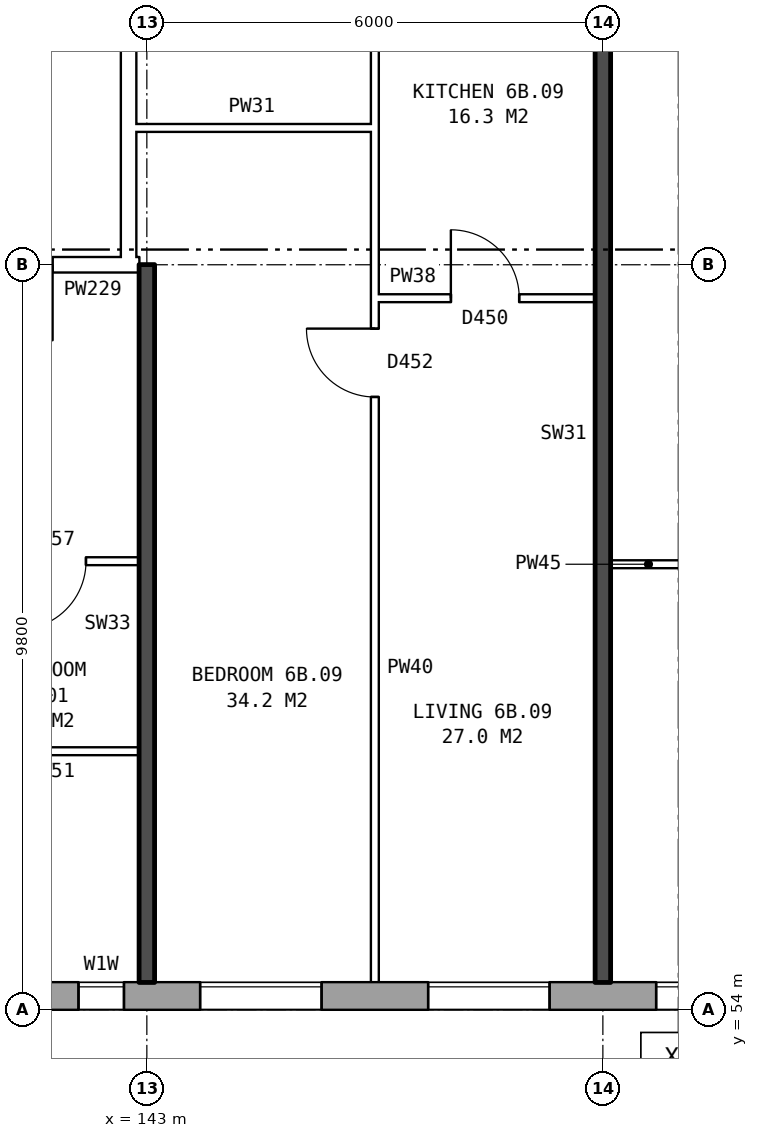
"""IFC4 building model, lengths in metres.
Left out: names, types, materials, properties, quantities, classifications, styles, units other than length and angle.
Written with IfcOpenShell. Run it as: python <this file> out.ifc"""

import sys

from ifc_helpers import new_model, si_unit, direction, frame, frame_2d, origin, place, context, subcontext, project, spatial, rectangle, extrude, element, fill, save


model = new_model("IFC4")
c1 = context("Model", 3, precision=1e-05, world=origin(), true_north=direction((0.0, 1.0)))
c2 = subcontext(c1, "Body", "Model", "MODEL_VIEW")
j1 = project(units=[si_unit("LENGTHUNIT", "METRE"), si_unit("PLANEANGLEUNIT", "RADIAN")], contexts=[c1])
p1 = place(None, origin())
s1 = spatial("IfcSite", under=j1, at=p1, CompositionType="ELEMENT")
p2 = place(p1, origin())
s2 = spatial("IfcBuilding", under=s1, at=p2, CompositionType="ELEMENT")
p3 = place(p2, frame((0.0, 0.0, 25.7)))
s3 = spatial("IfcBuildingStorey", under=s2, at=p3, CompositionType="ELEMENT", Elevation=25.7)
p4 = place(p3, frame((134.075, 54.18, 0.0), z_axis=(0.0, 0.0, 1.0), x_axis=(1.0, 0.0, 0.0)))
e1 = element("IfcWall", 1, at=p4, inside=s3, PredefinedType="STANDARD", context=c2, shape_type="SweptSolid", body=[
    extrude(rectangle(XDim=40.601, YDim=0.36, at=frame_2d((20.3, 0.0))), origin(), (0.0, 0.0, 1.0), 2.85),
])
p5 = place(p4, frame((0.625, 0.0, 0.8)))
e2 = element("IfcOpeningElement", 2, at=p5, cuts=e1, PredefinedType="OPENING", context=c2, shape_type="SweptSolid", body=[
    extrude(rectangle(XDim=1.6, YDim=1.8, at=frame_2d((0.8, 0.9))), frame((0.0, 0.19, 0.0), z_axis=(0.0, -1.0, 0.0), x_axis=(1.0, 0.0, 0.0)), (0.0, 0.0, 1.0), 0.38),
])
p6 = place(p4, frame((3.625, 0.0, 0.8)))
e3 = element("IfcOpeningElement", 3, at=p6, cuts=e1, PredefinedType="OPENING", context=c2, shape_type="SweptSolid", body=[
    extrude(rectangle(XDim=1.6, YDim=1.8, at=frame_2d((0.8, 0.9))), frame((0.0, 0.19, 0.0), z_axis=(0.0, -1.0, 0.0), x_axis=(1.0, 0.0, 0.0)), (0.0, 0.0, 1.0), 0.38),
])
p7 = place(p4, frame((5.525, 0.0, 1.7)))
e4 = element("IfcOpeningElement", 4, at=p7, cuts=e1, PredefinedType="OPENING", context=c2, shape_type="SweptSolid", body=[
    extrude(rectangle(XDim=1.2, YDim=0.9, at=frame_2d((0.6, 0.45))), frame((0.0, 0.19, 0.0), z_axis=(0.0, -1.0, 0.0), x_axis=(1.0, 0.0, 0.0)), (0.0, 0.0, 1.0), 0.38),
])
p8 = place(p4, frame((9.625, 0.0, 0.8)))
e5 = element("IfcOpeningElement", 5, at=p8, cuts=e1, PredefinedType="OPENING", context=c2, shape_type="SweptSolid", body=[
    extrude(rectangle(XDim=1.6, YDim=1.8, at=frame_2d((0.8, 0.9))), frame((0.0, 0.19, 0.0), z_axis=(0.0, -1.0, 0.0), x_axis=(1.0, 0.0, 0.0)), (0.0, 0.0, 1.0), 0.38),
])
p9 = place(p4, frame((12.625, 0.0, 0.8)))
e6 = element("IfcOpeningElement", 6, at=p9, cuts=e1, PredefinedType="OPENING", context=c2, shape_type="SweptSolid", body=[
    extrude(rectangle(XDim=1.6, YDim=1.8, at=frame_2d((0.8, 0.9))), frame((0.0, 0.19, 0.0), z_axis=(0.0, -1.0, 0.0), x_axis=(1.0, 0.0, 0.0)), (0.0, 0.0, 1.0), 0.38),
])
p10 = place(p4, frame((15.625, 0.0, 0.8)))
e7 = element("IfcOpeningElement", 7, at=p10, cuts=e1, PredefinedType="OPENING", context=c2, shape_type="SweptSolid", body=[
    extrude(rectangle(XDim=1.6, YDim=1.8, at=frame_2d((0.8, 0.9))), frame((0.0, 0.19, 0.0), z_axis=(0.0, -1.0, 0.0), x_axis=(1.0, 0.0, 0.0)), (0.0, 0.0, 1.0), 0.38),
])
p11 = place(p4, frame((18.625, 0.0, 0.8)))
e8 = element("IfcOpeningElement", 8, at=p11, cuts=e1, PredefinedType="OPENING", context=c2, shape_type="SweptSolid", body=[
    extrude(rectangle(XDim=1.6, YDim=1.8, at=frame_2d((0.8, 0.9))), frame((0.0, 0.19, 0.0), z_axis=(0.0, -1.0, 0.0), x_axis=(1.0, 0.0, 0.0)), (0.0, 0.0, 1.0), 0.38),
])
p12 = place(p4, frame((21.625, 0.0, 0.8)))
e9 = element("IfcOpeningElement", 9, at=p12, cuts=e1, PredefinedType="OPENING", context=c2, shape_type="SweptSolid", body=[
    extrude(rectangle(XDim=1.6, YDim=1.8, at=frame_2d((0.8, 0.9))), frame((0.0, 0.19, 0.0), z_axis=(0.0, -1.0, 0.0), x_axis=(1.0, 0.0, 0.0)), (0.0, 0.0, 1.0), 0.38),
])
p13 = place(p4, frame((24.625, 0.0, 0.8)))
e10 = element("IfcOpeningElement", 10, at=p13, cuts=e1, PredefinedType="OPENING", context=c2, shape_type="SweptSolid", body=[
    extrude(rectangle(XDim=1.6, YDim=1.8, at=frame_2d((0.8, 0.9))), frame((0.0, 0.19, 0.0), z_axis=(0.0, -1.0, 0.0), x_axis=(1.0, 0.0, 0.0)), (0.0, 0.0, 1.0), 0.38),
])
p14 = place(p4, frame((27.625, 0.0, 0.8)))
e11 = element("IfcOpeningElement", 11, at=p14, cuts=e1, PredefinedType="OPENING", context=c2, shape_type="SweptSolid", body=[
    extrude(rectangle(XDim=1.6, YDim=1.8, at=frame_2d((0.8, 0.9))), frame((0.0, 0.19, 0.0), z_axis=(0.0, -1.0, 0.0), x_axis=(1.0, 0.0, 0.0)), (0.0, 0.0, 1.0), 0.38),
])
p15 = place(p4, frame((30.125, 0.0, 0.8)))
e12 = element("IfcOpeningElement", 12, at=p15, cuts=e1, PredefinedType="OPENING", context=c2, shape_type="SweptSolid", body=[
    extrude(rectangle(XDim=1.2, YDim=1.8, at=frame_2d((0.6, 0.9))), frame((0.0, 0.19, 0.0), z_axis=(0.0, -1.0, 0.0), x_axis=(1.0, 0.0, 0.0)), (0.0, 0.0, 1.0), 0.38),
])
p16 = place(p4, frame((33.825, 0.0, 1.7)))
e13 = element("IfcOpeningElement", 13, at=p16, cuts=e1, PredefinedType="OPENING", context=c2, shape_type="SweptSolid", body=[
    extrude(rectangle(XDim=1.0, YDim=0.9, at=frame_2d((0.5, 0.45))), frame((0.0, 0.19, 0.0), z_axis=(0.0, -1.0, 0.0), x_axis=(1.0, 0.0, 0.0)), (0.0, 0.0, 1.0), 0.38),
])
p17 = place(p4, frame((36.625, 0.0, 0.8)))
e14 = element("IfcOpeningElement", 14, at=p17, cuts=e1, PredefinedType="OPENING", context=c2, shape_type="SweptSolid", body=[
    extrude(rectangle(XDim=1.6, YDim=1.8, at=frame_2d((0.8, 0.9))), frame((0.0, 0.19, 0.0), z_axis=(0.0, -1.0, 0.0), x_axis=(1.0, 0.0, 0.0)), (0.0, 0.0, 1.0), 0.38),
])
p18 = place(p4, frame((8.025, 0.0, 0.8)))
e15 = element("IfcOpeningElement", 15, at=p18, cuts=e1, PredefinedType="OPENING", context=c2, shape_type="SweptSolid", body=[
    extrude(rectangle(XDim=0.6, YDim=0.9, at=frame_2d((0.3, 0.45))), frame((0.0, 0.19, 0.0), z_axis=(0.0, -1.0, 0.0), x_axis=(1.0, 0.0, 0.0)), (0.0, 0.0, 1.0), 0.38),
])
p19 = place(p4, frame((31.625, 0.0, 0.8)))
e16 = element("IfcOpeningElement", 16, at=p19, cuts=e1, PredefinedType="OPENING", context=c2, shape_type="SweptSolid", body=[
    extrude(rectangle(XDim=0.6, YDim=1.2, at=frame_2d((0.3, 0.6))), frame((0.0, 0.19, 0.0), z_axis=(0.0, -1.0, 0.0), x_axis=(1.0, 0.0, 0.0)), (0.0, 0.0, 1.0), 0.38),
])
p20 = place(p4, frame((35.125, 0.0, 0.8)))
e17 = element("IfcOpeningElement", 17, at=p20, cuts=e1, PredefinedType="OPENING", context=c2, shape_type="SweptSolid", body=[
    extrude(rectangle(XDim=1.2, YDim=1.8, at=frame_2d((0.6, 0.9))), frame((0.0, 0.19, 0.0), z_axis=(0.0, -1.0, 0.0), x_axis=(1.0, 0.0, 0.0)), (0.0, 0.0, 1.0), 0.38),
])
p21 = place(p3, frame((142.76, 63.9, 0.0), z_axis=(0.0, 0.0, 1.0), x_axis=(0.0, 1.0, 0.0)))
e18 = element("IfcWall", 18, at=p21, inside=s3, PredefinedType="PARTITIONING", context=c2, shape_type="SweptSolid", body=[
    extrude(rectangle(XDim=12.2, YDim=0.2, at=frame_2d((6.1, 0.0))), origin(), (0.0, 0.0, 1.0), 2.85),
])
p22 = place(p21, frame((5.1, 0.0, 0.0)))
e19 = element("IfcOpeningElement", 19, at=p22, cuts=e18, PredefinedType="OPENING", context=c2, shape_type="SweptSolid", body=[
    extrude(rectangle(XDim=2.0, YDim=2.1, at=frame_2d((1.0, 1.05))), frame((0.0, 0.11, 0.0), z_axis=(0.0, -1.0, 0.0), x_axis=(1.0, 0.0, 0.0)), (0.0, 0.0, 1.0), 0.22),
])
p23 = place(p3, frame((140.6, 57.4, 0.0), z_axis=(0.0, 0.0, 1.0), x_axis=(1.0, 0.0, 0.0)))
e20 = element("IfcWall", 20, at=p23, inside=s3, PredefinedType="PARTITIONING", context=c2, shape_type="SweptSolid", body=[
    extrude(rectangle(XDim=2.3, YDim=0.1, at=frame_2d((1.15, 0.0))), origin(), (0.0, 0.0, 1.0), 2.85),
])
p24 = place(p3, frame((149.1, 59.86, 0.0), z_axis=(0.0, 0.0, 1.0), x_axis=(1.0, 0.0, 0.0)))
e21 = element("IfcWall", 21, at=p24, inside=s3, PredefinedType="PARTITIONING", context=c2, shape_type="SweptSolid", body=[
    extrude(rectangle(XDim=2.9, YDim=0.1, at=frame_2d((1.45, 0.0))), origin(), (0.0, 0.0, 1.0), 2.85),
])
p25 = place(p24, frame((1.0, 0.0, 0.0)))
e22 = element("IfcOpeningElement", 22, at=p25, cuts=e21, PredefinedType="OPENING", context=c2, shape_type="SweptSolid", body=[
    extrude(rectangle(XDim=0.9, YDim=2.1, at=frame_2d((0.45, 1.05))), frame((0.0, 0.06, 0.0), z_axis=(0.0, -1.0, 0.0), x_axis=(1.0, 0.0, 0.0)), (0.0, 0.0, 1.0), 0.12),
])
p26 = place(p3, frame((137.1, 59.9, 0.0), z_axis=(0.0, 0.0, 1.0), x_axis=(1.0, 0.0, 0.0)))
e23 = element("IfcWall", 23, at=p26, inside=s3, PredefinedType="PARTITIONING", context=c2, shape_type="SweptSolid", body=[
    extrude(rectangle(XDim=5.8, YDim=0.1, at=frame_2d((2.9, 0.0))), origin(), (0.0, 0.0, 1.0), 2.85),
])
p27 = place(p26, frame((1.3, 0.0, 0.0)))
e24 = element("IfcOpeningElement", 24, at=p27, cuts=e23, PredefinedType="OPENING", context=c2, shape_type="SweptSolid", body=[
    extrude(rectangle(XDim=0.9, YDim=2.1, at=frame_2d((0.45, 1.05))), frame((0.0, 0.06, 0.0), z_axis=(0.0, -1.0, 0.0), x_axis=(1.0, 0.0, 0.0)), (0.0, 0.0, 1.0), 0.12),
])
p28 = place(p26, frame((4.2, 0.0, 0.0)))
e25 = element("IfcOpeningElement", 25, at=p28, cuts=e23, PredefinedType="OPENING", context=c2, shape_type="SweptSolid", body=[
    extrude(rectangle(XDim=0.9, YDim=2.1, at=frame_2d((0.45, 1.05))), frame((0.0, 0.06, 0.0), z_axis=(0.0, -1.0, 0.0), x_axis=(1.0, 0.0, 0.0)), (0.0, 0.0, 1.0), 0.12),
])
p29 = place(p3, frame((146.0, 63.36, 0.0), z_axis=(0.0, 0.0, 1.0), x_axis=(1.0, 0.0, 0.0)))
e26 = element("IfcWall", 26, at=p29, inside=s3, PredefinedType="PARTITIONING", context=c2, shape_type="SweptSolid", body=[
    extrude(rectangle(XDim=2.9, YDim=0.1, at=frame_2d((1.45, 0.0))), origin(), (0.0, 0.0, 1.0), 2.85),
])
p30 = place(p29, frame((1.0, 0.0, 0.0)))
e27 = element("IfcOpeningElement", 27, at=p30, cuts=e26, PredefinedType="OPENING", context=c2, shape_type="SweptSolid", body=[
    extrude(rectangle(XDim=0.9, YDim=2.1, at=frame_2d((0.45, 1.05))), frame((0.0, 0.06, 0.0), z_axis=(0.0, -1.0, 0.0), x_axis=(1.0, 0.0, 0.0)), (0.0, 0.0, 1.0), 0.12),
])
p31 = place(p3, frame((139.76, 63.8, 0.0), z_axis=(0.0, 0.0, 1.0), x_axis=(1.0, 0.0, 0.0)))
e28 = element("IfcWall", 28, at=p31, inside=s3, PredefinedType="PARTITIONING", context=c2, shape_type="SweptSolid", body=[
    extrude(rectangle(XDim=3.0, YDim=0.2, at=frame_2d((1.5, 0.0))), origin(), (0.0, 0.0, 1.0), 2.85),
])
p32 = place(p31, frame((1.0, 0.0, 0.0)))
e29 = element("IfcOpeningElement", 29, at=p32, cuts=e28, PredefinedType="OPENING", context=c2, shape_type="SweptSolid", body=[
    extrude(rectangle(XDim=1.0, YDim=2.1, at=frame_2d((0.5, 1.05))), frame((0.0, 0.11, 0.0), z_axis=(0.0, -1.0, 0.0), x_axis=(1.0, 0.0, 0.0)), (0.0, 0.0, 1.0), 0.22),
])
p33 = place(p3, frame((142.76, 63.8, 0.0), z_axis=(0.0, 0.0, 1.0), x_axis=(1.0, 0.0, 0.0)))
e30 = element("IfcWall", 30, at=p33, inside=s3, PredefinedType="PARTITIONING", context=c2, shape_type="SweptSolid", body=[
    extrude(rectangle(XDim=0.14, YDim=0.2, at=frame_2d((0.07, 0.0))), origin(), (0.0, 0.0, 1.0), 2.85),
])
p34 = place(p3, frame((142.76, 65.6, 0.0), z_axis=(0.0, 0.0, 1.0), x_axis=(1.0, 0.0, 0.0)))
e31 = element("IfcWall", 31, at=p34, inside=s3, PredefinedType="PARTITIONING", context=c2, shape_type="SweptSolid", body=[
    extrude(rectangle(XDim=3.24, YDim=0.1, at=frame_2d((1.62, 0.0))), origin(), (0.0, 0.0, 1.0), 2.85),
])
p35 = place(p3, frame((143.0, 54.36, 0.0), z_axis=(0.0, 0.0, 1.0), x_axis=(0.0, 1.0, 0.0)))
e32 = element("IfcWall", 32, at=p35, inside=s3, PredefinedType="SOLIDWALL", context=c2, shape_type="SweptSolid", body=[
    extrude(rectangle(XDim=9.44, YDim=0.2, at=frame_2d((4.72, 0.0))), origin(), (0.0, 0.0, 1.0), 2.85),
])
p36 = place(p3, frame((146.0, 54.36, 0.0), z_axis=(0.0, 0.0, 1.0), x_axis=(0.0, 1.0, 0.0)))
e33 = element("IfcWall", 33, at=p36, inside=s3, PredefinedType="PARTITIONING", context=c2, shape_type="SweptSolid", body=[
    extrude(rectangle(XDim=14.34, YDim=0.1, at=frame_2d((7.17, 0.0))), origin(), (0.0, 0.0, 1.0), 2.85),
])
p37 = place(p36, frame((7.7, 0.0, 0.0)))
e34 = element("IfcOpeningElement", 34, at=p37, cuts=e33, PredefinedType="OPENING", context=c2, shape_type="SweptSolid", body=[
    extrude(rectangle(XDim=0.9, YDim=2.1, at=frame_2d((0.45, 1.05))), frame((0.0, 0.06, 0.0), z_axis=(0.0, -1.0, 0.0), x_axis=(1.0, 0.0, 0.0)), (0.0, 0.0, 1.0), 0.12),
])
p38 = place(p36, frame((13.04, 0.0, 0.0)))
e35 = element("IfcOpeningElement", 35, at=p38, cuts=e33, PredefinedType="OPENING", context=c2, shape_type="SweptSolid", body=[
    extrude(rectangle(XDim=0.9, YDim=2.1, at=frame_2d((0.45, 1.05))), frame((0.0, 0.06, 0.0), z_axis=(0.0, -1.0, 0.0), x_axis=(1.0, 0.0, 0.0)), (0.0, 0.0, 1.0), 0.12),
])
p39 = place(p3, frame((149.0, 54.36, 0.0), z_axis=(0.0, 0.0, 1.0), x_axis=(0.0, 1.0, 0.0)))
e36 = element("IfcWall", 36, at=p39, inside=s3, PredefinedType="SOLIDWALL", context=c2, shape_type="SweptSolid", body=[
    extrude(rectangle(XDim=14.44, YDim=0.2, at=frame_2d((7.22, 0.0))), origin(), (0.0, 0.0, 1.0), 2.85),
])
p40 = place(p8, origin())
e37 = element("IfcWindow", 37, at=p40, inside=s3, PartitioningType="SINGLE_PANEL", PredefinedType="WINDOW", context=c2, shape_type="SweptSolid", body=[
    extrude(rectangle(XDim=1.6, YDim=1.8, at=frame_2d((0.8, 0.9))), frame((0.0, 0.15, 0.0), z_axis=(0.0, -1.0, 0.0), x_axis=(1.0, 0.0, 0.0)), (0.0, 0.0, 1.0), 0.06),
])
fill(e5, e37)
p41 = place(p9, origin())
e38 = element("IfcWindow", 38, at=p41, inside=s3, PartitioningType="SINGLE_PANEL", PredefinedType="WINDOW", context=c2, shape_type="SweptSolid", body=[
    extrude(rectangle(XDim=1.6, YDim=1.8, at=frame_2d((0.8, 0.9))), frame((0.0, 0.15, 0.0), z_axis=(0.0, -1.0, 0.0), x_axis=(1.0, 0.0, 0.0)), (0.0, 0.0, 1.0), 0.06),
])
fill(e6, e38)
p42 = place(p10, origin())
e39 = element("IfcWindow", 39, at=p42, inside=s3, PartitioningType="SINGLE_PANEL", PredefinedType="WINDOW", context=c2, shape_type="SweptSolid", body=[
    extrude(rectangle(XDim=1.6, YDim=1.8, at=frame_2d((0.8, 0.9))), frame((0.0, 0.15, 0.0), z_axis=(0.0, -1.0, 0.0), x_axis=(1.0, 0.0, 0.0)), (0.0, 0.0, 1.0), 0.06),
])
fill(e7, e39)
p43 = place(p28, frame((0.9, 0.0, 0.0), z_axis=(0.0, 0.0, 1.0), x_axis=(-1.0, 0.0, 0.0)))
e40 = element("IfcDoor", 40, at=p43, inside=s3, OperationType="SINGLE_SWING_RIGHT", PredefinedType="DOOR", context=c2, shape_type="SweptSolid", body=[
    extrude(rectangle(XDim=0.9, YDim=2.1, at=frame_2d((0.45, 1.05))), frame((0.0, 0.025, 0.0), z_axis=(0.0, -1.0, 0.0), x_axis=(1.0, 0.0, 0.0)), (0.0, 0.0, 1.0), 0.05),
])
fill(e25, e40)
p44 = place(p37, origin())
e41 = element("IfcDoor", 41, at=p44, inside=s3, OperationType="SINGLE_SWING_RIGHT", PredefinedType="DOOR", context=c2, shape_type="SweptSolid", body=[
    extrude(rectangle(XDim=0.9, YDim=2.1, at=frame_2d((0.45, 1.05))), frame((0.0, 0.025, 0.0), z_axis=(0.0, -1.0, 0.0), x_axis=(1.0, 0.0, 0.0)), (0.0, 0.0, 1.0), 0.05),
])
fill(e34, e41)
p45 = place(p30, origin())
e42 = element("IfcDoor", 42, at=p45, inside=s3, OperationType="SINGLE_SWING_LEFT", PredefinedType="DOOR", context=c2, shape_type="SweptSolid", body=[
    extrude(rectangle(XDim=0.9, YDim=2.1, at=frame_2d((0.45, 1.05))), frame((0.0, 0.025, 0.0), z_axis=(0.0, -1.0, 0.0), x_axis=(1.0, 0.0, 0.0)), (0.0, 0.0, 1.0), 0.05),
])
fill(e27, e42)
p46 = place(p18, origin())
e43 = element("IfcWindow", 43, at=p46, inside=s3, PartitioningType="SINGLE_PANEL", PredefinedType="WINDOW", context=c2, shape_type="SweptSolid", body=[
    extrude(rectangle(XDim=0.6, YDim=0.9, at=frame_2d((0.3, 0.45))), frame((0.0, 0.15, 0.0), z_axis=(0.0, -1.0, 0.0), x_axis=(1.0, 0.0, 0.0)), (0.0, 0.0, 1.0), 0.06),
])
fill(e15, e43)
save(model, sys.argv[1])
